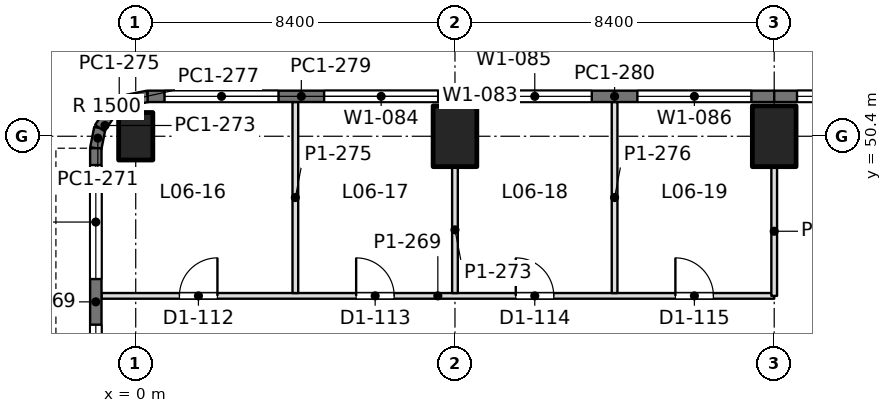
"""IFC4 building model, lengths in metres.
Left out: names, types, materials, properties, quantities, classifications, styles, units other than length and angle.
Written with IfcOpenShell. Run it as: python <this file> out.ifc"""

import sys

from ifc_helpers import new_model, si_unit, direction, frame, frame_2d, origin, origin_2d, place, context, subcontext, project, spatial, rectangle, extrude, element, fill, save


model = new_model("IFC4")
c1 = context("Model", 3, precision=1e-05, world=origin(), true_north=direction((0.0, 1.0)))
c2 = subcontext(c1, "Body", "Model", "MODEL_VIEW")
j1 = project(units=[si_unit("LENGTHUNIT", "METRE"), si_unit("PLANEANGLEUNIT", "RADIAN")], contexts=[c1])
p1 = place(None, origin())
s1 = spatial("IfcSite", under=j1, at=p1, CompositionType="ELEMENT")
p2 = place(p1, origin())
s2 = spatial("IfcBuilding", under=s1, at=p2, CompositionType="ELEMENT")
p3 = place(p2, frame((0.0, 0.0, 27.9)))
s3 = spatial("IfcBuildingStorey", under=s2, at=p3, CompositionType="ELEMENT", Elevation=27.9)
p4 = place(p3, frame((0.0, 50.4, 0.0), z_axis=(0.0, 0.0, 1.0), x_axis=(1.0, 0.0, 0.0)))
e1 = element("IfcColumn", 1, at=p4, inside=s3, PredefinedType="COLUMN", context=c2, shape_type="SweptSolid", body=[
    extrude(rectangle(XDim=0.9, YDim=1.25, at=origin_2d()), origin(), (0.0, 0.0, 1.0), 4.5),
])
for number, where, z_axis, x_axis in (
    (2, (8.4, 50.4, 0.0), (0.0, 0.0, 1.0), (1.0, 0.0, 0.0)),
    (3, (16.8, 50.4, 0.0), (0.0, 0.0, 1.0), (1.0, 0.0, 0.0)),
):
    element("IfcColumn", number, at=place(p3, frame(where, z_axis=z_axis, x_axis=x_axis)), inside=s3, PredefinedType="COLUMN", context=c2, shape_type="SweptSolid", body=[
        extrude(rectangle(XDim=1.15, YDim=1.6, at=origin_2d()), origin(), (0.0, 0.0, 1.0), 4.5),
    ])
p5 = place(p3, frame((-1.05, 42.0, 0.0), z_axis=(0.0, 0.0, 1.0), x_axis=(0.0, 1.0, 0.0)))
e4 = element("IfcWall", 4, at=p5, inside=s3, PredefinedType="SOLIDWALL", context=c2, shape_type="SweptSolid", body=[
    extrude(rectangle(XDim=8.085, YDim=0.3, at=frame_2d((4.042, 0.0))), origin(), (0.0, 0.0, 1.0), 4.34),
])
p6 = place(p5, frame((0.443, 0.0, 0.9)))
e5 = element("IfcOpeningElement", 5, at=p6, cuts=e4, PredefinedType="OPENING", context=c2, shape_type="SweptSolid", body=[
    extrude(rectangle(XDim=3.0, YDim=1.9, at=frame_2d((1.5, 0.95))), frame((0.0, 0.16, 0.0), z_axis=(0.0, -1.0, 0.0), x_axis=(1.0, 0.0, 0.0)), (0.0, 0.0, 1.0), 0.32),
])
p7 = place(p5, frame((4.643, 0.0, 0.9)))
e6 = element("IfcOpeningElement", 6, at=p7, cuts=e4, PredefinedType="OPENING", context=c2, shape_type="SweptSolid", body=[
    extrude(rectangle(XDim=3.0, YDim=1.9, at=frame_2d((1.5, 0.95))), frame((0.0, 0.16, 0.0), z_axis=(0.0, -1.0, 0.0), x_axis=(1.0, 0.0, 0.0)), (0.0, 0.0, 1.0), 0.32),
])
p8 = place(p3, frame((-1.05, 50.085, 0.0), z_axis=(0.0, 0.0, 1.0), x_axis=(0.195073962632, 0.980788534345, 0.0)))
e7 = element("IfcWall", 7, at=p8, inside=s3, PredefinedType="SOLIDWALL", context=c2, shape_type="SweptSolid", body=[
    extrude(rectangle(XDim=0.541, YDim=0.3, at=frame_2d((0.271, 0.0))), origin(), (0.0, 0.0, 1.0), 4.34),
])
for number, where, z_axis, x_axis in (
    (8, (-0.945, 50.615, 0.0), (0.0, 0.0, 1.0), (0.556, 0.831, 0.0)),
    (9, (-0.653, 51.052, 0.0), (0.0, 0.0, 1.0), (0.831, 0.556, 0.0)),
):
    element("IfcWall", number, at=place(p3, frame(where, z_axis=z_axis, x_axis=x_axis)), inside=s3, PredefinedType="SOLIDWALL", context=c2, shape_type="SweptSolid", body=[
        extrude(rectangle(XDim=0.526, YDim=0.3, at=frame_2d((0.263, 0.0))), origin(), (0.0, 0.0, 1.0), 4.34),
    ])
p9 = place(p3, frame((-0.216, 51.344, 0.0), z_axis=(0.0, 0.0, 1.0), x_axis=(0.980788534345, 0.195073962632, 0.0)))
e10 = element("IfcWall", 10, at=p9, inside=s3, PredefinedType="SOLIDWALL", context=c2, shape_type="SweptSolid", body=[
    extrude(rectangle(XDim=0.541, YDim=0.3, at=frame_2d((0.271, 0.0))), origin(), (0.0, 0.0, 1.0), 4.34),
])
p10 = place(p3, frame((0.315, 51.45, 0.0), z_axis=(0.0, 0.0, 1.0), x_axis=(1.0, 0.0, 0.0)))
e11 = element("IfcWall", 11, at=p10, inside=s3, PredefinedType="SOLIDWALL", context=c2, shape_type="SweptSolid", body=[
    extrude(rectangle(XDim=8.085, YDim=0.3, at=frame_2d((4.042, 0.0))), origin(), (0.0, 0.0, 1.0), 4.34),
])
p11 = place(p10, frame((0.443, 0.0, 0.9)))
e12 = element("IfcOpeningElement", 12, at=p11, cuts=e11, PredefinedType="OPENING", context=c2, shape_type="SweptSolid", body=[
    extrude(rectangle(XDim=3.0, YDim=1.9, at=frame_2d((1.5, 0.95))), frame((0.0, 0.16, 0.0), z_axis=(0.0, -1.0, 0.0), x_axis=(1.0, 0.0, 0.0)), (0.0, 0.0, 1.0), 0.32),
])
p12 = place(p10, frame((4.643, 0.0, 0.9)))
e13 = element("IfcOpeningElement", 13, at=p12, cuts=e11, PredefinedType="OPENING", context=c2, shape_type="SweptSolid", body=[
    extrude(rectangle(XDim=3.0, YDim=1.9, at=frame_2d((1.5, 0.95))), frame((0.0, 0.16, 0.0), z_axis=(0.0, -1.0, 0.0), x_axis=(1.0, 0.0, 0.0)), (0.0, 0.0, 1.0), 0.32),
])
p13 = place(p3, frame((8.4, 51.45, 0.0), z_axis=(0.0, 0.0, 1.0), x_axis=(1.0, 0.0, 0.0)))
e14 = element("IfcWall", 14, at=p13, inside=s3, PredefinedType="SOLIDWALL", context=c2, shape_type="SweptSolid", body=[
    extrude(rectangle(XDim=8.4, YDim=0.3, at=frame_2d((4.2, 0.0))), origin(), (0.0, 0.0, 1.0), 4.34),
])
p14 = place(p13, frame((0.6, 0.0, 0.9)))
e15 = element("IfcOpeningElement", 15, at=p14, cuts=e14, PredefinedType="OPENING", context=c2, shape_type="SweptSolid", body=[
    extrude(rectangle(XDim=3.0, YDim=1.9, at=frame_2d((1.5, 0.95))), frame((0.0, 0.16, 0.0), z_axis=(0.0, -1.0, 0.0), x_axis=(1.0, 0.0, 0.0)), (0.0, 0.0, 1.0), 0.32),
])
p15 = place(p13, frame((4.8, 0.0, 0.9)))
e16 = element("IfcOpeningElement", 16, at=p15, cuts=e14, PredefinedType="OPENING", context=c2, shape_type="SweptSolid", body=[
    extrude(rectangle(XDim=3.0, YDim=1.9, at=frame_2d((1.5, 0.95))), frame((0.0, 0.16, 0.0), z_axis=(0.0, -1.0, 0.0), x_axis=(1.0, 0.0, 0.0)), (0.0, 0.0, 1.0), 0.32),
])
p16 = place(p3, frame((16.8, 51.45, 0.0), z_axis=(0.0, 0.0, 1.0), x_axis=(1.0, 0.0, 0.0)))
e17 = element("IfcWall", 17, at=p16, inside=s3, PredefinedType="SOLIDWALL", context=c2, shape_type="SweptSolid", body=[
    extrude(rectangle(XDim=8.4, YDim=0.3, at=frame_2d((4.2, 0.0))), origin(), (0.0, 0.0, 1.0), 4.34),
])
p17 = place(p16, frame((0.6, 0.0, 0.9)))
e18 = element("IfcOpeningElement", 18, at=p17, cuts=e17, PredefinedType="OPENING", context=c2, shape_type="SweptSolid", body=[
    extrude(rectangle(XDim=3.0, YDim=1.9, at=frame_2d((1.5, 0.95))), frame((0.0, 0.16, 0.0), z_axis=(0.0, -1.0, 0.0), x_axis=(1.0, 0.0, 0.0)), (0.0, 0.0, 1.0), 0.32),
])
p18 = place(p16, frame((4.8, 0.0, 0.9)))
e19 = element("IfcOpeningElement", 19, at=p18, cuts=e17, PredefinedType="OPENING", context=c2, shape_type="SweptSolid", body=[
    extrude(rectangle(XDim=3.0, YDim=1.9, at=frame_2d((1.5, 0.95))), frame((0.0, 0.16, 0.0), z_axis=(0.0, -1.0, 0.0), x_axis=(1.0, 0.0, 0.0)), (0.0, 0.0, 1.0), 0.32),
])
p19 = place(p3, frame((-0.902, 46.2, 0.0), z_axis=(0.0, 0.0, 1.0), x_axis=(1.0, 0.0, 0.0)))
e20 = element("IfcWall", 20, at=p19, inside=s3, PredefinedType="PARTITIONING", context=c2, shape_type="SweptSolid", body=[
    extrude(rectangle(XDim=17.702, YDim=0.15, at=frame_2d((8.851, 0.0))), origin(), (0.0, 0.0, 1.0), 3.74),
])
p20 = place(p19, frame((2.052, 0.0, 0.0)))
e21 = element("IfcOpeningElement", 21, at=p20, cuts=e20, PredefinedType="OPENING", context=c2, shape_type="SweptSolid", body=[
    extrude(rectangle(XDim=1.0, YDim=2.2, at=frame_2d((0.5, 1.1))), frame((0.0, 0.085, 0.0), z_axis=(0.0, -1.0, 0.0), x_axis=(1.0, 0.0, 0.0)), (0.0, 0.0, 1.0), 0.17),
])
p21 = place(p19, frame((6.702, 0.0, 0.0)))
e22 = element("IfcOpeningElement", 22, at=p21, cuts=e20, PredefinedType="OPENING", context=c2, shape_type="SweptSolid", body=[
    extrude(rectangle(XDim=1.0, YDim=2.2, at=frame_2d((0.5, 1.1))), frame((0.0, 0.085, 0.0), z_axis=(0.0, -1.0, 0.0), x_axis=(1.0, 0.0, 0.0)), (0.0, 0.0, 1.0), 0.17),
])
p22 = place(p19, frame((10.902, 0.0, 0.0)))
e23 = element("IfcOpeningElement", 23, at=p22, cuts=e20, PredefinedType="OPENING", context=c2, shape_type="SweptSolid", body=[
    extrude(rectangle(XDim=1.0, YDim=2.2, at=frame_2d((0.5, 1.1))), frame((0.0, 0.085, 0.0), z_axis=(0.0, -1.0, 0.0), x_axis=(1.0, 0.0, 0.0)), (0.0, 0.0, 1.0), 0.17),
])
p23 = place(p19, frame((15.102, 0.0, 0.0)))
e24 = element("IfcOpeningElement", 24, at=p23, cuts=e20, PredefinedType="OPENING", context=c2, shape_type="SweptSolid", body=[
    extrude(rectangle(XDim=1.0, YDim=2.2, at=frame_2d((0.5, 1.1))), frame((0.0, 0.085, 0.0), z_axis=(0.0, -1.0, 0.0), x_axis=(1.0, 0.0, 0.0)), (0.0, 0.0, 1.0), 0.17),
])
p24 = place(p3, frame((4.2, 46.274, 0.0), z_axis=(0.0, 0.0, 1.0), x_axis=(0.0, 1.0, 0.0)))
e25 = element("IfcWall", 25, at=p24, inside=s3, PredefinedType="PARTITIONING", context=c2, shape_type="SweptSolid", body=[
    extrude(rectangle(XDim=5.028, YDim=0.15, at=frame_2d((2.514, 0.0))), origin(), (0.0, 0.0, 1.0), 3.84),
])
p25 = place(p3, frame((8.4, 46.274, 0.0), z_axis=(0.0, 0.0, 1.0), x_axis=(0.0, 1.0, 0.0)))
e26 = element("IfcWall", 26, at=p25, inside=s3, PredefinedType="PARTITIONING", context=c2, shape_type="SweptSolid", body=[
    extrude(rectangle(XDim=3.327, YDim=0.15, at=frame_2d((1.664, 0.0))), origin(), (0.0, 0.0, 1.0), 3.74),
])
p26 = place(p3, frame((12.6, 46.274, 0.0), z_axis=(0.0, 0.0, 1.0), x_axis=(0.0, 1.0, 0.0)))
e27 = element("IfcWall", 27, at=p26, inside=s3, PredefinedType="PARTITIONING", context=c2, shape_type="SweptSolid", body=[
    extrude(rectangle(XDim=5.028, YDim=0.15, at=frame_2d((2.514, 0.0))), origin(), (0.0, 0.0, 1.0), 3.84),
])
p27 = place(p3, frame((16.8, 46.2, 0.0), z_axis=(0.0, 0.0, 1.0), x_axis=(0.0, 1.0, 0.0)))
e28 = element("IfcWall", 28, at=p27, inside=s3, PredefinedType="PARTITIONING", context=c2, shape_type="SweptSolid", body=[
    extrude(rectangle(XDim=3.401, YDim=0.15, at=frame_2d((1.701, 0.0))), origin(), (0.0, 0.0, 1.0), 3.74),
])
p28 = place(p6, origin())
e29 = element("IfcWindow", 29, at=p28, inside=s3, PartitioningType="SINGLE_PANEL", PredefinedType="WINDOW", context=c2, shape_type="SweptSolid", body=[
    extrude(rectangle(XDim=3.0, YDim=1.9, at=frame_2d((1.5, 0.95))), frame((0.0, 0.03, 0.0), z_axis=(0.0, -1.0, 0.0), x_axis=(1.0, 0.0, 0.0)), (0.0, 0.0, 1.0), 0.06),
])
fill(e5, e29)
p29 = place(p7, origin())
e30 = element("IfcWindow", 30, at=p29, inside=s3, PartitioningType="SINGLE_PANEL", PredefinedType="WINDOW", context=c2, shape_type="SweptSolid", body=[
    extrude(rectangle(XDim=3.0, YDim=1.9, at=frame_2d((1.5, 0.95))), frame((0.0, 0.03, 0.0), z_axis=(0.0, -1.0, 0.0), x_axis=(1.0, 0.0, 0.0)), (0.0, 0.0, 1.0), 0.06),
])
fill(e6, e30)
p30 = place(p11, origin())
e31 = element("IfcWindow", 31, at=p30, inside=s3, PartitioningType="SINGLE_PANEL", PredefinedType="WINDOW", context=c2, shape_type="SweptSolid", body=[
    extrude(rectangle(XDim=3.0, YDim=1.9, at=frame_2d((1.5, 0.95))), frame((0.0, 0.03, 0.0), z_axis=(0.0, -1.0, 0.0), x_axis=(1.0, 0.0, 0.0)), (0.0, 0.0, 1.0), 0.06),
])
fill(e12, e31)
p31 = place(p12, origin())
e32 = element("IfcWindow", 32, at=p31, inside=s3, PartitioningType="SINGLE_PANEL", PredefinedType="WINDOW", context=c2, shape_type="SweptSolid", body=[
    extrude(rectangle(XDim=3.0, YDim=1.9, at=frame_2d((1.5, 0.95))), frame((0.0, 0.03, 0.0), z_axis=(0.0, -1.0, 0.0), x_axis=(1.0, 0.0, 0.0)), (0.0, 0.0, 1.0), 0.06),
])
fill(e13, e32)
p32 = place(p14, origin())
e33 = element("IfcWindow", 33, at=p32, inside=s3, PartitioningType="SINGLE_PANEL", PredefinedType="WINDOW", context=c2, shape_type="SweptSolid", body=[
    extrude(rectangle(XDim=3.0, YDim=1.9, at=frame_2d((1.5, 0.95))), frame((0.0, 0.03, 0.0), z_axis=(0.0, -1.0, 0.0), x_axis=(1.0, 0.0, 0.0)), (0.0, 0.0, 1.0), 0.06),
])
fill(e15, e33)
p33 = place(p15, origin())
e34 = element("IfcWindow", 34, at=p33, inside=s3, PartitioningType="SINGLE_PANEL", PredefinedType="WINDOW", context=c2, shape_type="SweptSolid", body=[
    extrude(rectangle(XDim=3.0, YDim=1.9, at=frame_2d((1.5, 0.95))), frame((0.0, 0.03, 0.0), z_axis=(0.0, -1.0, 0.0), x_axis=(1.0, 0.0, 0.0)), (0.0, 0.0, 1.0), 0.06),
])
fill(e16, e34)
p34 = place(p17, origin())
e35 = element("IfcWindow", 35, at=p34, inside=s3, PartitioningType="SINGLE_PANEL", PredefinedType="WINDOW", context=c2, shape_type="SweptSolid", body=[
    extrude(rectangle(XDim=3.0, YDim=1.9, at=frame_2d((1.5, 0.95))), frame((0.0, 0.03, 0.0), z_axis=(0.0, -1.0, 0.0), x_axis=(1.0, 0.0, 0.0)), (0.0, 0.0, 1.0), 0.06),
])
fill(e18, e35)
p35 = place(p20, origin())
e36 = element("IfcDoor", 36, at=p35, inside=s3, OperationType="SINGLE_SWING_RIGHT", PredefinedType="DOOR", context=c2, shape_type="SweptSolid", body=[
    extrude(rectangle(XDim=1.0, YDim=2.2, at=frame_2d((0.5, 1.1))), frame((0.0, 0.025, 0.0), z_axis=(0.0, -1.0, 0.0), x_axis=(1.0, 0.0, 0.0)), (0.0, 0.0, 1.0), 0.05),
])
fill(e21, e36)
p36 = place(p21, origin())
e37 = element("IfcDoor", 37, at=p36, inside=s3, OperationType="SINGLE_SWING_LEFT", PredefinedType="DOOR", context=c2, shape_type="SweptSolid", body=[
    extrude(rectangle(XDim=1.0, YDim=2.2, at=frame_2d((0.5, 1.1))), frame((0.0, 0.025, 0.0), z_axis=(0.0, -1.0, 0.0), x_axis=(1.0, 0.0, 0.0)), (0.0, 0.0, 1.0), 0.05),
])
fill(e22, e37)
p37 = place(p22, origin())
e38 = element("IfcDoor", 38, at=p37, inside=s3, OperationType="SINGLE_SWING_LEFT", PredefinedType="DOOR", context=c2, shape_type="SweptSolid", body=[
    extrude(rectangle(XDim=1.0, YDim=2.2, at=frame_2d((0.5, 1.1))), frame((0.0, 0.025, 0.0), z_axis=(0.0, -1.0, 0.0), x_axis=(1.0, 0.0, 0.0)), (0.0, 0.0, 1.0), 0.05),
])
fill(e23, e38)
p38 = place(p23, origin())
e39 = element("IfcDoor", 39, at=p38, inside=s3, OperationType="SINGLE_SWING_LEFT", PredefinedType="DOOR", context=c2, shape_type="SweptSolid", body=[
    extrude(rectangle(XDim=1.0, YDim=2.2, at=frame_2d((0.5, 1.1))), frame((0.0, 0.025, 0.0), z_axis=(0.0, -1.0, 0.0), x_axis=(1.0, 0.0, 0.0)), (0.0, 0.0, 1.0), 0.05),
])
fill(e24, e39)
save(model, sys.argv[1])
